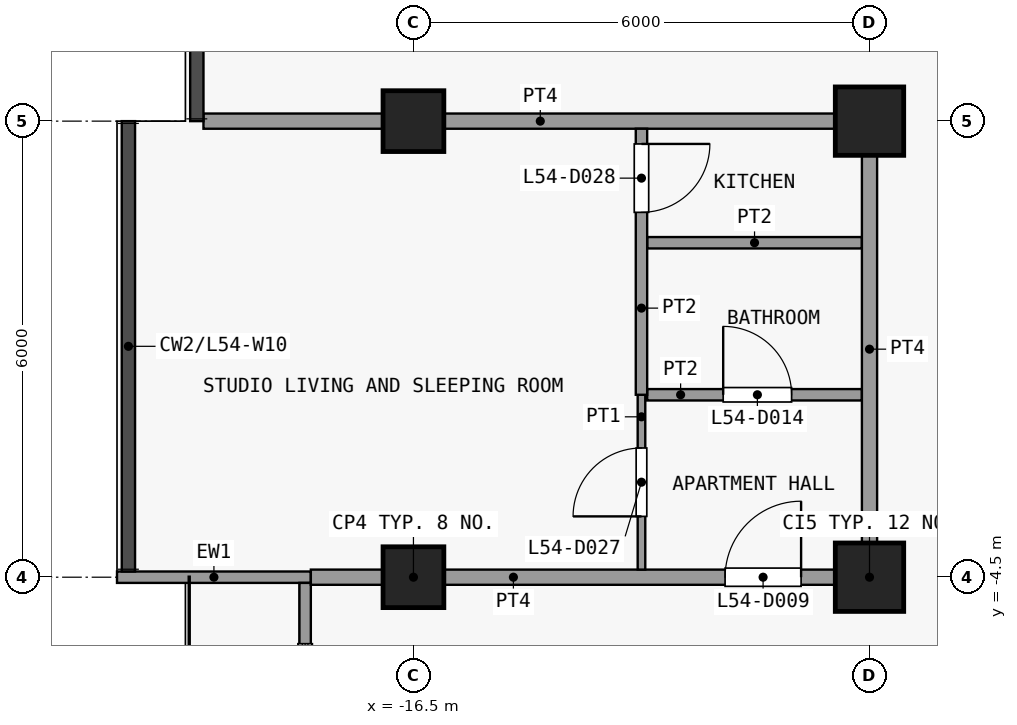
"""IFC4 building model, lengths in metres.
Left out: names, types, materials, properties, quantities, classifications, styles, units other than length and angle.
Written with IfcOpenShell. Run it as: python <this file> out.ifc"""

import sys

from ifc_helpers import new_model, si_unit, direction, frame, frame_2d, origin, origin_2d, place, context, subcontext, project, spatial, rectangle, extrude, element, fill, save


model = new_model("IFC4")
c1 = context("Model", 3, precision=1e-05, world=origin(), true_north=direction((0.0, 1.0)))
c2 = subcontext(c1, "Body", "Model", "MODEL_VIEW")
j1 = project(units=[si_unit("LENGTHUNIT", "METRE"), si_unit("PLANEANGLEUNIT", "RADIAN")], contexts=[c1])
p1 = place(None, origin())
s1 = spatial("IfcSite", under=j1, at=p1, CompositionType="ELEMENT")
p2 = place(p1, origin())
s2 = spatial("IfcBuilding", under=s1, at=p2, CompositionType="ELEMENT")
p3 = place(p2, frame((0.0, 0.0, 215.9)))
s3 = spatial("IfcBuildingStorey", under=s2, at=p3, CompositionType="ELEMENT", Elevation=215.9)
for number, where, z_axis, x_axis in (
    (1, (-16.5, -4.5, 0.0), (0.0, 0.0, 1.0), (1.0, 0.0, 0.0)),
    (2, (-16.5, 1.5, 0.0), (0.0, 0.0, 1.0), (1.0, 0.0, 0.0)),
):
    element("IfcColumn", number, at=place(p3, frame(where, z_axis=z_axis, x_axis=x_axis)), inside=s3, PredefinedType="COLUMN", context=c2, shape_type="SweptSolid", body=[
        extrude(rectangle(XDim=0.8, YDim=0.8, at=origin_2d()), origin(), (0.0, 0.0, 1.0), 3.6),
    ])
for number, where, z_axis, x_axis in (
    (3, (-10.5, -4.5, 0.0), (0.0, 0.0, 1.0), (1.0, 0.0, 0.0)),
    (4, (-10.5, 1.5, 0.0), (0.0, 0.0, 1.0), (1.0, 0.0, 0.0)),
):
    element("IfcColumn", number, at=place(p3, frame(where, z_axis=z_axis, x_axis=x_axis)), inside=s3, PredefinedType="COLUMN", context=c2, shape_type="SweptSolid", body=[
        extrude(rectangle(XDim=0.9, YDim=0.9, at=origin_2d()), origin(), (0.0, 0.0, 1.0), 3.6),
    ])
p4 = place(p3, frame((-17.85, -4.5, 0.0), z_axis=(0.0, 0.0, 1.0), x_axis=(-1.0, 0.0, 0.0)))
e5 = element("IfcWall", 5, at=p4, inside=s3, PredefinedType="SOLIDWALL", context=c2, shape_type="SweptSolid", body=[
    extrude(rectangle(XDim=2.55, YDim=0.15, at=frame_2d((1.275, 0.0))), origin(), (0.0, 0.0, 1.0), 3.3),
])
p5 = place(p3, frame((-17.925, -13.425, 0.0), z_axis=(0.0, 0.0, 1.0), x_axis=(0.0, 1.0, 0.0)))
e6 = element("IfcWall", 6, at=p5, inside=s3, PredefinedType="SOLIDWALL", context=c2, shape_type="SweptSolid", body=[
    extrude(rectangle(XDim=8.85, YDim=0.15, at=frame_2d((4.425, 0.0))), origin(), (0.0, 0.0, 1.0), 3.3),
])
p6 = place(p5, frame((3.05, 0.0, 0.0)))
e7 = element("IfcOpeningElement", 7, at=p6, cuts=e6, PredefinedType="OPENING", context=c2, shape_type="SweptSolid", body=[
    extrude(rectangle(XDim=1.2, YDim=2.4, at=frame_2d((0.6, 1.2))), frame((0.0, 0.085, 0.0), z_axis=(0.0, -1.0, 0.0), x_axis=(1.0, 0.0, 0.0)), (0.0, 0.0, 1.0), 0.17),
])
p7 = place(p5, frame((0.25, 0.0, 0.9)))
e8 = element("IfcOpeningElement", 8, at=p7, cuts=e6, PredefinedType="OPENING", context=c2, shape_type="SweptSolid", body=[
    extrude(rectangle(XDim=2.05, YDim=2.1, at=frame_2d((1.025, 1.05))), frame((0.0, 0.085, 0.0), z_axis=(0.0, -1.0, 0.0), x_axis=(1.0, 0.0, 0.0)), (0.0, 0.0, 1.0), 0.17),
])
p8 = place(p5, frame((5.775, 0.0, 0.9)))
e9 = element("IfcOpeningElement", 9, at=p8, cuts=e6, PredefinedType="OPENING", context=c2, shape_type="SweptSolid", body=[
    extrude(rectangle(XDim=2.275, YDim=2.1, at=frame_2d((1.137, 1.05))), frame((0.0, 0.085, 0.0), z_axis=(0.0, -1.0, 0.0), x_axis=(1.0, 0.0, 0.0)), (0.0, 0.0, 1.0), 0.17),
])
p9 = place(p3, frame((-17.85, -4.5, 0.0), z_axis=(0.0, 0.0, 1.0), x_axis=(1.0, 0.0, 0.0)))
e10 = element("IfcWall", 10, at=p9, inside=s3, PredefinedType="PARTITIONING", context=c2, shape_type="SweptSolid", body=[
    extrude(rectangle(XDim=7.45, YDim=0.2, at=frame_2d((3.725, 0.0))), origin(), (0.0, 0.0, 1.0), 3.3),
])
p10 = place(p9, frame((5.45, 0.0, 0.0)))
e11 = element("IfcOpeningElement", 11, at=p10, cuts=e10, PredefinedType="OPENING", context=c2, shape_type="SweptSolid", body=[
    extrude(rectangle(XDim=1.0, YDim=2.1, at=frame_2d((0.5, 1.05))), frame((0.0, 0.11, 0.0), z_axis=(0.0, -1.0, 0.0), x_axis=(1.0, 0.0, 0.0)), (0.0, 0.0, 1.0), 0.22),
])
p11 = place(p3, frame((-13.425, -2.1, 0.0), z_axis=(0.0, 0.0, 1.0), x_axis=(1.0, 0.0, 0.0)))
e12 = element("IfcWall", 12, at=p11, inside=s3, PredefinedType="PARTITIONING", context=c2, shape_type="SweptSolid", body=[
    extrude(rectangle(XDim=2.825, YDim=0.15, at=frame_2d((1.413, 0.0))), origin(), (0.0, 0.0, 1.0), 3.3),
])
p12 = place(p11, frame((1.0, 0.0, 0.0)))
e13 = element("IfcOpeningElement", 13, at=p12, cuts=e12, PredefinedType="OPENING", context=c2, shape_type="SweptSolid", body=[
    extrude(rectangle(XDim=0.9, YDim=2.1, at=frame_2d((0.45, 1.05))), frame((0.0, 0.085, 0.0), z_axis=(0.0, -1.0, 0.0), x_axis=(1.0, 0.0, 0.0)), (0.0, 0.0, 1.0), 0.17),
])
p13 = place(p3, frame((-13.425, -0.1, 0.0), z_axis=(0.0, 0.0, 1.0), x_axis=(1.0, 0.0, 0.0)))
e14 = element("IfcWall", 14, at=p13, inside=s3, PredefinedType="PARTITIONING", context=c2, shape_type="SweptSolid", body=[
    extrude(rectangle(XDim=2.825, YDim=0.15, at=frame_2d((1.413, 0.0))), origin(), (0.0, 0.0, 1.0), 3.3),
])
p14 = place(p3, frame((-19.262, 1.5, 0.0), z_axis=(0.0, 0.0, 1.0), x_axis=(1.0, 0.0, 0.0)))
e15 = element("IfcWall", 15, at=p14, inside=s3, PredefinedType="PARTITIONING", context=c2, shape_type="SweptSolid", body=[
    extrude(rectangle(XDim=8.863, YDim=0.2, at=frame_2d((4.431, 0.0))), origin(), (0.0, 0.0, 1.0), 3.3),
])
p15 = place(p3, frame((-13.5, -4.4, 0.0), z_axis=(0.0, 0.0, 1.0), x_axis=(0.0, 1.0, 0.0)))
e16 = element("IfcWall", 16, at=p15, inside=s3, PredefinedType="PARTITIONING", context=c2, shape_type="SweptSolid", body=[
    extrude(rectangle(XDim=2.3, YDim=0.1, at=frame_2d((1.15, 0.0))), origin(), (0.0, 0.0, 1.0), 3.3),
])
p16 = place(p15, frame((0.7, 0.0, 0.0)))
e17 = element("IfcOpeningElement", 17, at=p16, cuts=e16, PredefinedType="OPENING", context=c2, shape_type="SweptSolid", body=[
    extrude(rectangle(XDim=0.9, YDim=2.1, at=frame_2d((0.45, 1.05))), frame((0.0, 0.06, 0.0), z_axis=(0.0, -1.0, 0.0), x_axis=(1.0, 0.0, 0.0)), (0.0, 0.0, 1.0), 0.12),
])
p17 = place(p3, frame((-13.5, -2.1, 0.0), z_axis=(0.0, 0.0, 1.0), x_axis=(0.0, 1.0, 0.0)))
e18 = element("IfcWall", 18, at=p17, inside=s3, PredefinedType="PARTITIONING", context=c2, shape_type="SweptSolid", body=[
    extrude(rectangle(XDim=3.5, YDim=0.15, at=frame_2d((1.75, 0.0))), origin(), (0.0, 0.0, 1.0), 3.3),
])
p18 = place(p17, frame((2.4, 0.0, 0.0)))
e19 = element("IfcOpeningElement", 19, at=p18, cuts=e18, PredefinedType="OPENING", context=c2, shape_type="SweptSolid", body=[
    extrude(rectangle(XDim=0.9, YDim=2.1, at=frame_2d((0.45, 1.05))), frame((0.0, 0.085, 0.0), z_axis=(0.0, -1.0, 0.0), x_axis=(1.0, 0.0, 0.0)), (0.0, 0.0, 1.0), 0.17),
])
p19 = place(p3, frame((-10.5, -4.4, 0.0), z_axis=(0.0, 0.0, 1.0), x_axis=(0.0, 1.0, 0.0)))
e20 = element("IfcWall", 20, at=p19, inside=s3, PredefinedType="PARTITIONING", context=c2, shape_type="SweptSolid", body=[
    extrude(rectangle(XDim=5.8, YDim=0.2, at=frame_2d((2.9, 0.0))), origin(), (0.0, 0.0, 1.0), 3.3),
])
p20 = place(p8, origin())
e21 = element("IfcWindow", 21, at=p20, inside=s3, PartitioningType="SINGLE_PANEL", PredefinedType="WINDOW", context=c2, shape_type="SweptSolid", body=[
    extrude(rectangle(XDim=2.275, YDim=2.1, at=frame_2d((1.137, 1.05))), frame((0.0, 0.03, 0.0), z_axis=(0.0, -1.0, 0.0), x_axis=(1.0, 0.0, 0.0)), (0.0, 0.0, 1.0), 0.06),
])
fill(e9, e21)
p21 = place(p10, origin())
e22 = element("IfcDoor", 22, at=p21, inside=s3, OperationType="SINGLE_SWING_LEFT", PredefinedType="DOOR", context=c2, shape_type="SweptSolid", body=[
    extrude(rectangle(XDim=1.0, YDim=2.1, at=frame_2d((0.5, 1.05))), frame((0.0, 0.025, 0.0), z_axis=(0.0, -1.0, 0.0), x_axis=(1.0, 0.0, 0.0)), (0.0, 0.0, 1.0), 0.05),
])
fill(e11, e22)
p22 = place(p12, origin())
e23 = element("IfcDoor", 23, at=p22, inside=s3, OperationType="SINGLE_SWING_RIGHT", PredefinedType="DOOR", context=c2, shape_type="SweptSolid", body=[
    extrude(rectangle(XDim=0.9, YDim=2.1, at=frame_2d((0.45, 1.05))), frame((0.0, 0.025, 0.0), z_axis=(0.0, -1.0, 0.0), x_axis=(1.0, 0.0, 0.0)), (0.0, 0.0, 1.0), 0.05),
])
fill(e13, e23)
p23 = place(p16, origin())
e24 = element("IfcDoor", 24, at=p23, inside=s3, OperationType="SINGLE_SWING_RIGHT", PredefinedType="DOOR", context=c2, shape_type="SweptSolid", body=[
    extrude(rectangle(XDim=0.9, YDim=2.1, at=frame_2d((0.45, 1.05))), frame((0.0, 0.025, 0.0), z_axis=(0.0, -1.0, 0.0), x_axis=(1.0, 0.0, 0.0)), (0.0, 0.0, 1.0), 0.05),
])
fill(e17, e24)
p24 = place(p18, origin())
e25 = element("IfcDoor", 25, at=p24, inside=s3, OperationType="SINGLE_SWING_RIGHT", PredefinedType="DOOR", context=c2, shape_type="SweptSolid", body=[
    extrude(rectangle(XDim=0.9, YDim=2.1, at=frame_2d((0.45, 1.05))), frame((0.0, 0.025, 0.0), z_axis=(0.0, -1.0, 0.0), x_axis=(1.0, 0.0, 0.0)), (0.0, 0.0, 1.0), 0.05),
])
fill(e19, e25)
save(model, sys.argv[1])
